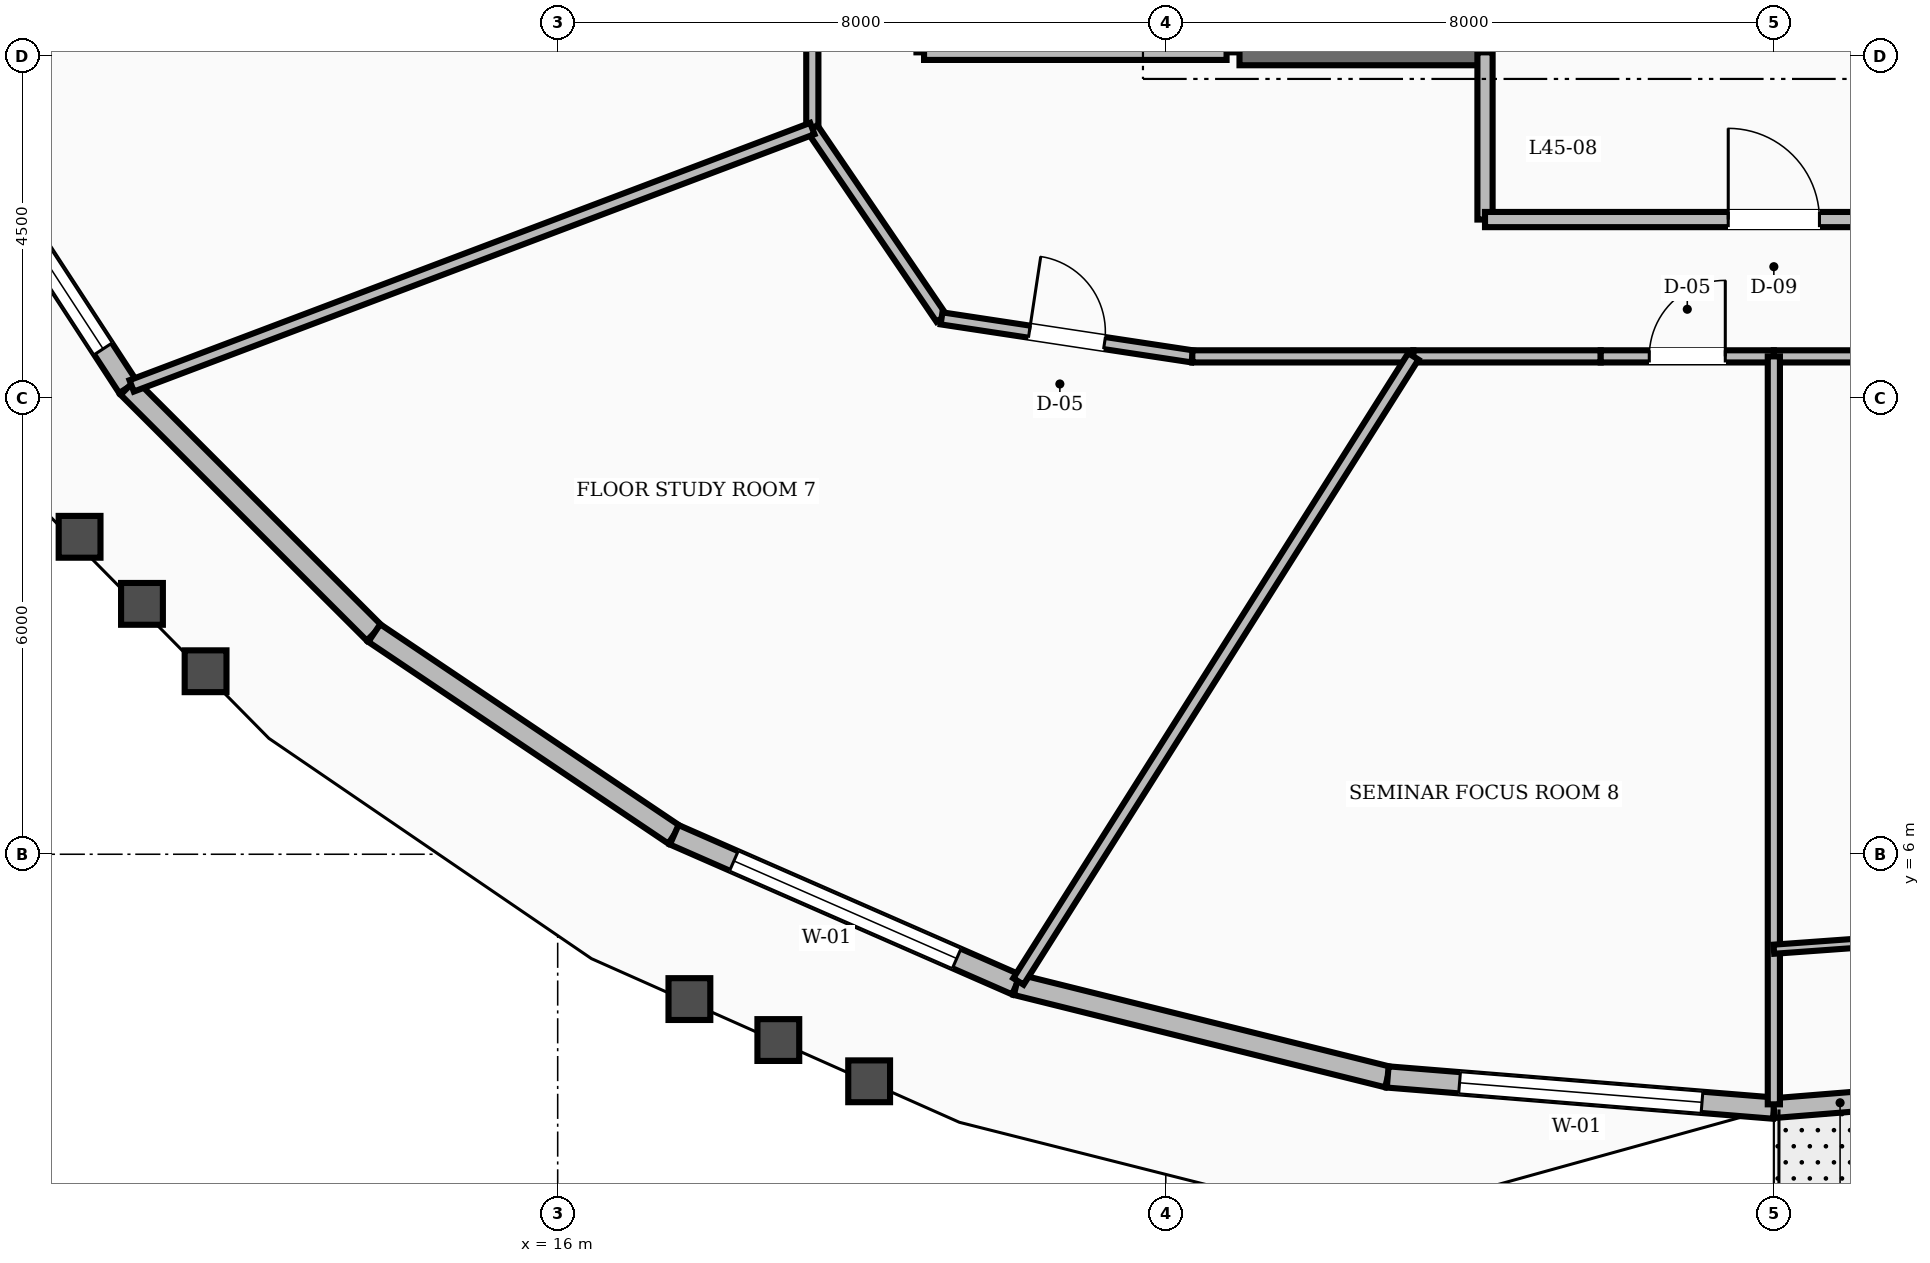
"""IFC4 building model, lengths in metres.
Left out: names, types, materials, properties, quantities, classifications, styles, units other than length and angle.
Written with IfcOpenShell. Run it as: python <this file> out.ifc"""

import sys

from ifc_helpers import new_model, si_unit, direction, frame, frame_2d, origin, place, context, subcontext, project, spatial, rectangle, extrude, element, fill, save


model = new_model("IFC4")
c1 = context("Model", 3, precision=1e-05, world=origin(), true_north=direction((0.0, 1.0)))
c2 = subcontext(c1, "Body", "Model", "MODEL_VIEW")
j1 = project(units=[si_unit("LENGTHUNIT", "METRE"), si_unit("PLANEANGLEUNIT", "RADIAN")], contexts=[c1])
p1 = place(None, origin())
s1 = spatial("IfcSite", under=j1, at=p1, CompositionType="ELEMENT")
p2 = place(p1, origin())
s2 = spatial("IfcBuilding", under=s1, at=p2, CompositionType="ELEMENT")
p3 = place(p2, frame((0.0, 0.0, 174.8)))
s3 = spatial("IfcBuildingStorey", under=s2, at=p3, CompositionType="ELEMENT", Elevation=174.8)
p4 = place(p3, frame((24.97, 16.55, 0.0), z_axis=(0.0, 0.0, 1.0), x_axis=(1.0, 0.0, 0.0)))
e1 = element("IfcWall", 1, at=p4, inside=s3, PredefinedType="SHEAR", context=c2, shape_type="SweptSolid", body=[
    extrude(rectangle(XDim=3.23, YDim=0.34, at=frame_2d((1.615, 0.0))), origin(), (0.0, 0.0, 1.0), 3.6),
])
p5 = place(p3, frame((7.942, 15.833, 0.0), z_axis=(0.0, 0.0, 1.0), x_axis=(0.54628130625, -0.837601775573, 0.0)))
e2 = element("IfcWall", 2, at=p5, inside=s3, PredefinedType="STANDARD", context=c2, shape_type="SweptSolid", body=[
    extrude(rectangle(XDim=4.405, YDim=0.28, at=frame_2d((2.202, 0.0))), origin(), (0.0, 0.0, 1.0), 2.82),
])
p6 = place(p5, frame((0.602, 0.0, 0.8)))
e3 = element("IfcOpeningElement", 3, at=p6, cuts=e2, PredefinedType="OPENING", context=c2, shape_type="SweptSolid", body=[
    extrude(rectangle(XDim=3.2, YDim=1.65, at=frame_2d((1.6, 0.825))), frame((0.0, 0.15, 0.0), z_axis=(0.0, -1.0, 0.0), x_axis=(1.0, 0.0, 0.0)), (0.0, 0.0, 1.0), 0.3),
])
p7 = place(p3, frame((10.348, 12.144, 0.0), z_axis=(0.0, 0.0, 1.0), x_axis=(0.707640043992, -0.706573115919, 0.0)))
e4 = element("IfcWall", 4, at=p7, inside=s3, PredefinedType="STANDARD", context=c2, shape_type="SweptSolid", body=[
    extrude(rectangle(XDim=4.576, YDim=0.28, at=frame_2d((2.288, 0.0))), origin(), (0.0, 0.0, 1.0), 2.82),
])
p8 = place(p3, frame((13.587, 8.91, 0.0), z_axis=(0.0, 0.0, 1.0), x_axis=(0.829776575502, -0.558095721851, 0.0)))
e5 = element("IfcWall", 5, at=p8, inside=s3, PredefinedType="STANDARD", context=c2, shape_type="SweptSolid", body=[
    extrude(rectangle(XDim=4.756, YDim=0.28, at=frame_2d((2.378, 0.0))), origin(), (0.0, 0.0, 1.0), 2.82),
])
p9 = place(p3, frame((17.533, 6.256, 0.0), z_axis=(0.0, 0.0, 1.0), x_axis=(0.915983961181, -0.401214883647, 0.0)))
e6 = element("IfcWall", 6, at=p9, inside=s3, PredefinedType="STANDARD", context=c2, shape_type="SweptSolid", body=[
    extrude(rectangle(XDim=4.915, YDim=0.28, at=frame_2d((2.458, 0.0))), origin(), (0.0, 0.0, 1.0), 2.82),
])
p10 = place(p9, frame((0.857, 0.0, 0.8)))
e7 = element("IfcOpeningElement", 7, at=p10, cuts=e6, PredefinedType="OPENING", context=c2, shape_type="SweptSolid", body=[
    extrude(rectangle(XDim=3.2, YDim=1.65, at=frame_2d((1.6, 0.825))), frame((0.0, 0.15, 0.0), z_axis=(0.0, -1.0, 0.0), x_axis=(1.0, 0.0, 0.0)), (0.0, 0.0, 1.0), 0.3),
])
p11 = place(p3, frame((22.035, 4.284, 0.0), z_axis=(0.0, 0.0, 1.0), x_axis=(0.970464034564, -0.241245844766, 0.0)))
e8 = element("IfcWall", 8, at=p11, inside=s3, PredefinedType="STANDARD", context=c2, shape_type="SweptSolid", body=[
    extrude(rectangle(XDim=5.034, YDim=0.28, at=frame_2d((2.517, 0.0))), origin(), (0.0, 0.0, 1.0), 2.82),
])
p12 = place(p3, frame((26.92, 3.07, 0.0), z_axis=(0.0, 0.0, 1.0), x_axis=(0.996756522082, -0.080476305128, 0.0)))
e9 = element("IfcWall", 9, at=p12, inside=s3, PredefinedType="STANDARD", context=c2, shape_type="SweptSolid", body=[
    extrude(rectangle(XDim=5.097, YDim=0.28, at=frame_2d((2.548, 0.0))), origin(), (0.0, 0.0, 1.0), 2.82),
])
p13 = place(p12, frame((0.948, 0.0, 0.8)))
e10 = element("IfcOpeningElement", 10, at=p13, cuts=e9, PredefinedType="OPENING", context=c2, shape_type="SweptSolid", body=[
    extrude(rectangle(XDim=3.2, YDim=1.65, at=frame_2d((1.6, 0.825))), frame((0.0, 0.15, 0.0), z_axis=(0.0, -1.0, 0.0), x_axis=(1.0, 0.0, 0.0)), (0.0, 0.0, 1.0), 0.3),
])
p14 = place(p3, frame((32.0, 2.66, 0.0), z_axis=(0.0, 0.0, 1.0), x_axis=(0.996756522082, 0.080476305128, 0.0)))
e11 = element("IfcWall", 11, at=p14, inside=s3, PredefinedType="STANDARD", context=c2, shape_type="SweptSolid", body=[
    extrude(rectangle(XDim=5.097, YDim=0.26, at=frame_2d((2.548, 0.0))), origin(), (0.0, 0.0, 1.0), 2.82),
])
p15 = place(p14, frame((1.998, 0.0, 0.0)))
e12 = element("IfcOpeningElement", 12, at=p15, cuts=e11, PredefinedType="OPENING", context=c2, shape_type="SweptSolid", body=[
    extrude(rectangle(XDim=1.1, YDim=2.15, at=frame_2d((0.55, 1.075))), frame((0.0, 0.14, 0.0), z_axis=(0.0, -1.0, 0.0), x_axis=(1.0, 0.0, 0.0)), (0.0, 0.0, 1.0), 0.28),
])
p16 = place(p3, frame((20.82, 16.55, 0.0), z_axis=(0.0, 0.0, 1.0), x_axis=(1.0, 0.0, 0.0)))
e13 = element("IfcWall", 13, at=p16, inside=s3, PredefinedType="SOLIDWALL", context=c2, shape_type="SweptSolid", body=[
    extrude(rectangle(XDim=3.98, YDim=0.2, at=frame_2d((1.99, 0.0))), origin(), (0.0, 0.0, 1.0), 2.8),
])
p17 = place(p3, frame((28.2, 14.35, 0.0), z_axis=(0.0, 0.0, 1.0), x_axis=(0.0, 1.0, 0.0)))
e14 = element("IfcWall", 14, at=p17, inside=s3, PredefinedType="SOLIDWALL", context=c2, shape_type="SweptSolid", body=[
    extrude(rectangle(XDim=2.2, YDim=0.2, at=frame_2d((1.1, 0.0))), origin(), (0.0, 0.0, 1.0), 2.8),
])
p18 = place(p3, frame((28.2, 14.35, 0.0), z_axis=(0.0, 0.0, 1.0), x_axis=(1.0, 0.0, 0.0)))
e15 = element("IfcWall", 15, at=p18, inside=s3, PredefinedType="SOLIDWALL", context=c2, shape_type="SweptSolid", body=[
    extrude(rectangle(XDim=7.6, YDim=0.2, at=frame_2d((3.8, 0.0))), origin(), (0.0, 0.0, 1.0), 2.8),
])
p19 = place(p18, frame((3.2, 0.0, 0.0)))
e16 = element("IfcOpeningElement", 16, at=p19, cuts=e15, PredefinedType="OPENING", context=c2, shape_type="SweptSolid", body=[
    extrude(rectangle(XDim=1.2, YDim=2.1, at=frame_2d((0.6, 1.05))), frame((0.0, 0.11, 0.0), z_axis=(0.0, -1.0, 0.0), x_axis=(1.0, 0.0, 0.0)), (0.0, 0.0, 1.0), 0.22),
])
p20 = place(p3, frame((19.35, 18.76, 0.0), z_axis=(0.0, 0.0, 1.0), x_axis=(0.0, -1.0, 0.0)))
e17 = element("IfcWall", 17, at=p20, inside=s3, PredefinedType="SOLIDWALL", context=c2, shape_type="SweptSolid", body=[
    extrude(rectangle(XDim=3.213, YDim=0.16, at=frame_2d((1.606, 0.0))), origin(), (0.0, 0.0, 1.0), 2.8),
])
p21 = place(p3, frame((19.35, 15.548, 0.0), z_axis=(0.0, 0.0, 1.0), x_axis=(0.562674669208, -0.826678423955, 0.0)))
e18 = element("IfcWall", 18, at=p21, inside=s3, PredefinedType="SOLIDWALL", context=c2, shape_type="SweptSolid", body=[
    extrude(rectangle(XDim=3.021, YDim=0.16, at=frame_2d((1.511, 0.0))), origin(), (0.0, 0.0, 1.0), 2.8),
])
p22 = place(p3, frame((21.05, 13.05, 0.0), z_axis=(0.0, 0.0, 1.0), x_axis=(0.988710906508, -0.149835721217, 0.0)))
e19 = element("IfcWall", 19, at=p22, inside=s3, PredefinedType="SOLIDWALL", context=c2, shape_type="SweptSolid", body=[
    extrude(rectangle(XDim=3.337, YDim=0.16, at=frame_2d((1.668, 0.0))), origin(), (0.0, 0.0, 1.0), 2.8),
])
p23 = place(p22, frame((1.168, 0.0, 0.0)))
e20 = element("IfcOpeningElement", 20, at=p23, cuts=e19, PredefinedType="OPENING", context=c2, shape_type="SweptSolid", body=[
    extrude(rectangle(XDim=1.0, YDim=2.1, at=frame_2d((0.5, 1.05))), frame((0.0, 0.09, 0.0), z_axis=(0.0, -1.0, 0.0), x_axis=(1.0, 0.0, 0.0)), (0.0, 0.0, 1.0), 0.18),
])
p24 = place(p3, frame((24.349, 12.55, 0.0), z_axis=(0.0, 0.0, 1.0), x_axis=(1.0, 0.0, 0.0)))
e21 = element("IfcWall", 21, at=p24, inside=s3, PredefinedType="SOLIDWALL", context=c2, shape_type="SweptSolid", body=[
    extrude(rectangle(XDim=2.908, YDim=0.16, at=frame_2d((1.454, 0.0))), origin(), (0.0, 0.0, 1.0), 2.8),
])
p25 = place(p3, frame((27.257, 12.55, 0.0), z_axis=(0.0, 0.0, 1.0), x_axis=(1.0, 0.0, 0.0)))
e22 = element("IfcWall", 22, at=p25, inside=s3, PredefinedType="SOLIDWALL", context=c2, shape_type="SweptSolid", body=[
    extrude(rectangle(XDim=2.465, YDim=0.16, at=frame_2d((1.232, 0.0))), origin(), (0.0, 0.0, 1.0), 2.8),
])
p26 = place(p3, frame((29.722, 12.55, 0.0), z_axis=(0.0, 0.0, 1.0), x_axis=(1.0, 0.0, 0.0)))
e23 = element("IfcWall", 23, at=p26, inside=s3, PredefinedType="SOLIDWALL", context=c2, shape_type="SweptSolid", body=[
    extrude(rectangle(XDim=2.278, YDim=0.16, at=frame_2d((1.139, 0.0))), origin(), (0.0, 0.0, 1.0), 2.8),
])
p27 = place(p26, frame((0.639, 0.0, 0.0)))
e24 = element("IfcOpeningElement", 24, at=p27, cuts=e23, PredefinedType="OPENING", context=c2, shape_type="SweptSolid", body=[
    extrude(rectangle(XDim=1.0, YDim=2.1, at=frame_2d((0.5, 1.05))), frame((0.0, 0.09, 0.0), z_axis=(0.0, -1.0, 0.0), x_axis=(1.0, 0.0, 0.0)), (0.0, 0.0, 1.0), 0.18),
])
p28 = place(p3, frame((32.0, 12.55, 0.0), z_axis=(0.0, 0.0, 1.0), x_axis=(1.0, 0.0, 0.0)))
e25 = element("IfcWall", 25, at=p28, inside=s3, PredefinedType="SOLIDWALL", context=c2, shape_type="SweptSolid", body=[
    extrude(rectangle(XDim=2.278, YDim=0.16, at=frame_2d((1.139, 0.0))), origin(), (0.0, 0.0, 1.0), 2.8),
])
p29 = place(p3, frame((19.35, 15.548, 0.0), z_axis=(0.0, 0.0, 1.0), x_axis=(-0.935375198529, -0.353656949568, 0.0)))
e26 = element("IfcWall", 26, at=p29, inside=s3, PredefinedType="SOLIDWALL", context=c2, shape_type="SweptSolid", body=[
    extrude(rectangle(XDim=9.573, YDim=0.16, at=frame_2d((4.787, 0.0))), origin(), (0.0, 0.0, 1.0), 2.8),
])
p30 = place(p3, frame((27.257, 12.55, 0.0), z_axis=(0.0, 0.0, 1.0), x_axis=(-0.534145959156, -0.845392272449, 0.0)))
e27 = element("IfcWall", 27, at=p30, inside=s3, PredefinedType="SOLIDWALL", context=c2, shape_type="SweptSolid", body=[
    extrude(rectangle(XDim=9.727, YDim=0.16, at=frame_2d((4.864, 0.0))), origin(), (0.0, 0.0, 1.0), 2.8),
])
p31 = place(p3, frame((32.0, 12.55, 0.0), z_axis=(0.0, 0.0, 1.0), x_axis=(0.0, -1.0, 0.0)))
e28 = element("IfcWall", 28, at=p31, inside=s3, PredefinedType="SOLIDWALL", context=c2, shape_type="SweptSolid", body=[
    extrude(rectangle(XDim=9.84, YDim=0.16, at=frame_2d((4.92, 0.0))), origin(), (0.0, 0.0, 1.0), 2.8),
])
p32 = place(p3, frame((32.0, 4.75, 0.0), z_axis=(0.0, 0.0, 1.0), x_axis=(0.997412216748, 0.071894852964, 0.0)))
e29 = element("IfcWall", 29, at=p32, inside=s3, PredefinedType="PARTITIONING", context=c2, shape_type="SweptSolid", body=[
    extrude(rectangle(XDim=4.5, YDim=0.12, at=frame_2d((2.25, 0.0))), origin(), (0.0, 0.0, 1.0), 2.8),
])
p33 = place(p32, frame((1.775, 0.0, 0.0)))
e30 = element("IfcOpeningElement", 30, at=p33, cuts=e29, PredefinedType="OPENING", context=c2, shape_type="SweptSolid", body=[
    extrude(rectangle(XDim=0.95, YDim=2.1, at=frame_2d((0.475, 1.05))), frame((0.0, 0.07, 0.0), z_axis=(0.0, -1.0, 0.0), x_axis=(1.0, 0.0, 0.0)), (0.0, 0.0, 1.0), 0.14),
])
p34 = place(p6, origin())
e31 = element("IfcWindow", 31, at=p34, inside=s3, PartitioningType="SINGLE_PANEL", PredefinedType="WINDOW", context=c2, shape_type="SweptSolid", body=[
    extrude(rectangle(XDim=3.2, YDim=1.65, at=frame_2d((1.6, 0.825))), frame((0.0, 0.03, 0.0), z_axis=(0.0, -1.0, 0.0), x_axis=(1.0, 0.0, 0.0)), (0.0, 0.0, 1.0), 0.06),
])
fill(e3, e31)
p35 = place(p10, origin())
e32 = element("IfcWindow", 32, at=p35, inside=s3, PartitioningType="SINGLE_PANEL", PredefinedType="WINDOW", context=c2, shape_type="SweptSolid", body=[
    extrude(rectangle(XDim=3.2, YDim=1.65, at=frame_2d((1.6, 0.825))), frame((0.0, 0.03, 0.0), z_axis=(0.0, -1.0, 0.0), x_axis=(1.0, 0.0, 0.0)), (0.0, 0.0, 1.0), 0.06),
])
fill(e7, e32)
p36 = place(p13, origin())
e33 = element("IfcWindow", 33, at=p36, inside=s3, PartitioningType="SINGLE_PANEL", PredefinedType="WINDOW", context=c2, shape_type="SweptSolid", body=[
    extrude(rectangle(XDim=3.2, YDim=1.65, at=frame_2d((1.6, 0.825))), frame((0.0, 0.03, 0.0), z_axis=(0.0, -1.0, 0.0), x_axis=(1.0, 0.0, 0.0)), (0.0, 0.0, 1.0), 0.06),
])
fill(e10, e33)
p37 = place(p19, origin())
e34 = element("IfcDoor", 34, at=p37, inside=s3, OperationType="SINGLE_SWING_LEFT", PredefinedType="DOOR", context=c2, shape_type="SweptSolid", body=[
    extrude(rectangle(XDim=1.2, YDim=2.1, at=frame_2d((0.6, 1.05))), frame((0.0, 0.025, 0.0), z_axis=(0.0, -1.0, 0.0), x_axis=(1.0, 0.0, 0.0)), (0.0, 0.0, 1.0), 0.05),
])
fill(e16, e34)
p38 = place(p23, origin())
e35 = element("IfcDoor", 35, at=p38, inside=s3, OperationType="SINGLE_SWING_LEFT", PredefinedType="DOOR", context=c2, shape_type="SweptSolid", body=[
    extrude(rectangle(XDim=1.0, YDim=2.1, at=frame_2d((0.5, 1.05))), frame((0.0, 0.025, 0.0), z_axis=(0.0, -1.0, 0.0), x_axis=(1.0, 0.0, 0.0)), (0.0, 0.0, 1.0), 0.05),
])
fill(e20, e35)
p39 = place(p27, origin())
e36 = element("IfcDoor", 36, at=p39, inside=s3, OperationType="SINGLE_SWING_RIGHT", PredefinedType="DOOR", context=c2, shape_type="SweptSolid", body=[
    extrude(rectangle(XDim=1.0, YDim=2.1, at=frame_2d((0.5, 1.05))), frame((0.0, 0.025, 0.0), z_axis=(0.0, -1.0, 0.0), x_axis=(1.0, 0.0, 0.0)), (0.0, 0.0, 1.0), 0.05),
])
fill(e24, e36)
save(model, sys.argv[1])
